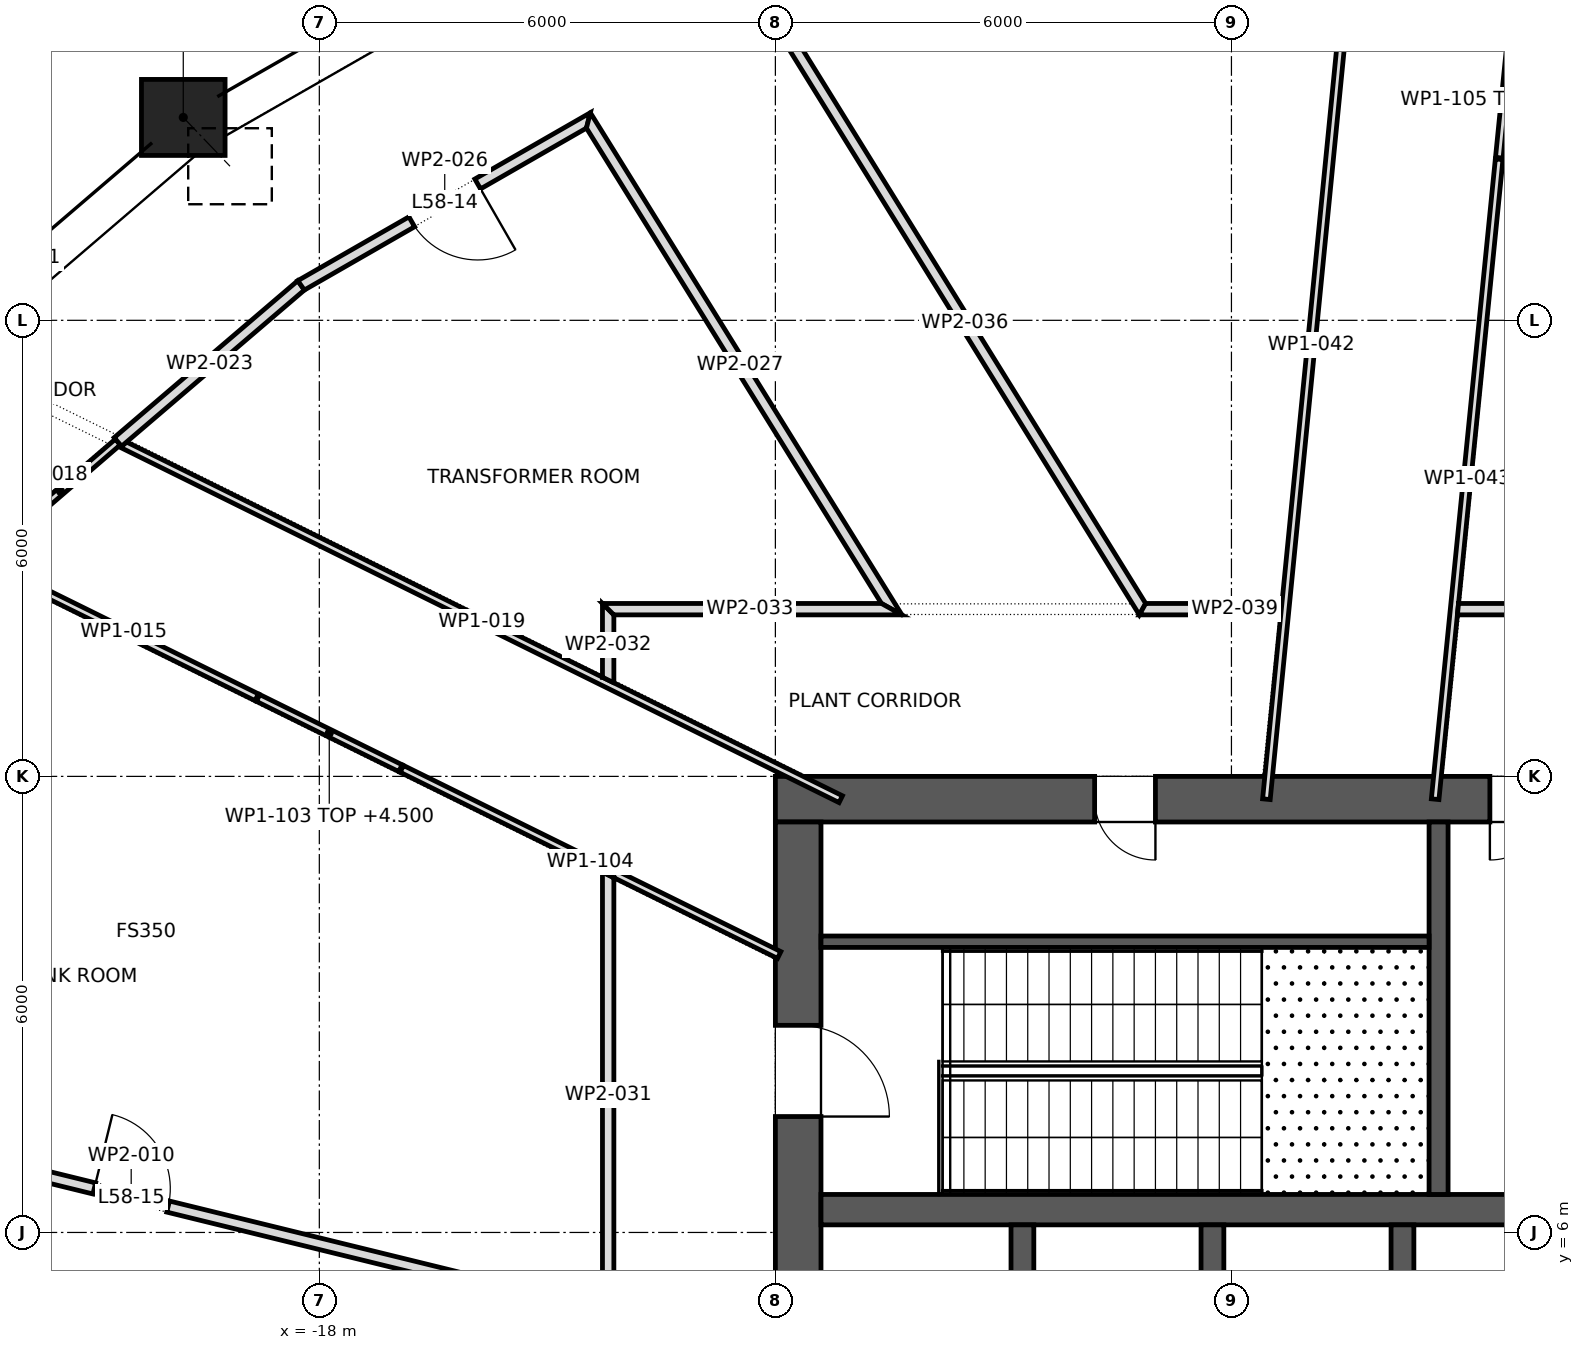
"""IFC4 building model, lengths in metres.
Left out: names, types, materials, properties, quantities, classifications, styles, units other than length and angle.
Written with IfcOpenShell. Run it as: python <this file> out.ifc"""

import sys

from ifc_helpers import new_model, si_unit, direction, frame, frame_2d, origin, origin_2d, place, context, subcontext, project, spatial, polyline, rectangle, outline, extrude, element, fill, save


model = new_model("IFC4")
c1 = context("Model", 3, precision=1e-05, world=origin(), true_north=direction((0.0, 1.0)))
c2 = subcontext(c1, "Body", "Model", "MODEL_VIEW")
j1 = project(units=[si_unit("LENGTHUNIT", "METRE"), si_unit("PLANEANGLEUNIT", "RADIAN")], contexts=[c1])
p1 = place(None, origin())
s1 = spatial("IfcSite", under=j1, at=p1, CompositionType="ELEMENT")
p2 = place(p1, origin())
s2 = spatial("IfcBuilding", under=s1, at=p2, CompositionType="ELEMENT")
p3 = place(p2, frame((0.0, 0.0, 250.9)))
s3 = spatial("IfcBuildingStorey", under=s2, at=p3, CompositionType="ELEMENT", Elevation=250.9)
p4 = place(p3, frame((-19.79, 20.669, 0.083), z_axis=(0.115812481815, -0.12096379157, 0.985877898213), x_axis=(0.722319686129, 0.691559304059, 0.0)))
e1 = element("IfcColumn", 1, at=p4, inside=s3, PredefinedType="COLUMN", context=c2, shape_type="SweptSolid", body=[
    extrude(rectangle(XDim=1.1, YDim=1.0, at=origin_2d()), origin(), (0.0, 0.0, 1.0), 5.308),
])
p5 = place(p3, frame((-12.0, 11.7, 0.0), z_axis=(0.0, 0.0, 1.0), x_axis=(1.0, 0.0, 0.0)))
e2 = element("IfcWall", 2, at=p5, inside=s3, PredefinedType="SHEAR", context=c2, shape_type="SweptSolid", body=[
    extrude(rectangle(XDim=24.0, YDim=0.6, at=frame_2d((12.0, 0.0))), origin(), (0.0, 0.0, 1.0), 5.4),
])
p6 = place(p5, frame((9.4, 0.0, 0.0)))
e3 = element("IfcOpeningElement", 3, at=p6, cuts=e2, PredefinedType="OPENING", context=c2, shape_type="SweptSolid", body=[
    extrude(rectangle(XDim=0.8, YDim=2.1, at=frame_2d((0.4, 1.05))), frame((0.0, 0.312, 0.0), z_axis=(0.0, -1.0, 0.0), x_axis=(1.0, 0.0, 0.0)), (0.0, 0.0, 1.0), 0.624),
])
p7 = place(p5, frame((11.05, 0.0, 0.0)))
e4 = element("IfcOpeningElement", 4, at=p7, cuts=e2, PredefinedType="OPENING", context=c2, shape_type="SweptSolid", body=[
    extrude(rectangle(XDim=0.8, YDim=2.1, at=frame_2d((0.4, 1.05))), frame((0.0, 0.312, 0.0), z_axis=(0.0, -1.0, 0.0), x_axis=(1.0, 0.0, 0.0)), (0.0, 0.0, 1.0), 0.624),
])
p8 = place(p5, frame((4.2, 0.0, 0.0)))
e5 = element("IfcOpeningElement", 5, at=p8, cuts=e2, PredefinedType="OPENING", context=c2, shape_type="SweptSolid", body=[
    extrude(rectangle(XDim=0.8, YDim=2.1, at=frame_2d((0.4, 1.05))), frame((0.0, 0.312, 0.0), z_axis=(0.0, -1.0, 0.0), x_axis=(1.0, 0.0, 0.0)), (0.0, 0.0, 1.0), 0.624),
])
p9 = place(p5, frame((15.85, 0.0, 0.0)))
e6 = element("IfcOpeningElement", 6, at=p9, cuts=e2, PredefinedType="OPENING", context=c2, shape_type="SweptSolid", body=[
    extrude(rectangle(XDim=0.8, YDim=2.1, at=frame_2d((0.4, 1.05))), frame((0.0, 0.312, 0.0), z_axis=(0.0, -1.0, 0.0), x_axis=(1.0, 0.0, 0.0)), (0.0, 0.0, 1.0), 0.624),
])
p10 = place(p3, frame((-11.7, -11.4, 0.0), z_axis=(0.0, 0.0, 1.0), x_axis=(0.0, 1.0, 0.0)))
e7 = element("IfcWall", 7, at=p10, inside=s3, PredefinedType="SHEAR", context=c2, shape_type="SweptSolid", body=[
    extrude(rectangle(XDim=22.8, YDim=0.6, at=frame_2d((11.4, 0.0))), origin(), (0.0, 0.0, 1.0), 5.4),
])
p11 = place(p10, frame((10.2, 0.0, 0.0)))
e8 = element("IfcOpeningElement", 8, at=p11, cuts=e7, PredefinedType="OPENING", context=c2, shape_type="SweptSolid", body=[
    extrude(rectangle(XDim=2.4, YDim=2.1, at=frame_2d((1.2, 1.05))), frame((0.0, 0.312, 0.0), z_axis=(0.0, -1.0, 0.0), x_axis=(1.0, 0.0, 0.0)), (0.0, 0.0, 1.0), 0.624),
])
p12 = place(p10, frame((18.925, 0.0, 0.0)))
e9 = element("IfcOpeningElement", 9, at=p12, cuts=e7, PredefinedType="OPENING", context=c2, shape_type="SweptSolid", body=[
    extrude(rectangle(XDim=1.2, YDim=2.1, at=frame_2d((0.6, 1.05))), frame((0.0, 0.312, 0.0), z_axis=(0.0, -1.0, 0.0), x_axis=(1.0, 0.0, 0.0)), (0.0, 0.0, 1.0), 0.624),
])
p13 = place(p10, frame((2.675, 0.0, 0.0)))
e10 = element("IfcOpeningElement", 10, at=p13, cuts=e7, PredefinedType="OPENING", context=c2, shape_type="SweptSolid", body=[
    extrude(rectangle(XDim=1.2, YDim=2.1, at=frame_2d((0.6, 1.05))), frame((0.0, 0.312, 0.0), z_axis=(0.0, -1.0, 0.0), x_axis=(1.0, 0.0, 0.0)), (0.0, 0.0, 1.0), 0.624),
])
p14 = place(p3, frame((-11.4, 6.3, 0.0), z_axis=(0.0, 0.0, 1.0), x_axis=(1.0, 0.0, 0.0)))
e11 = element("IfcWall", 11, at=p14, inside=s3, PredefinedType="SHEAR", context=c2, shape_type="SweptSolid", body=[
    extrude(rectangle(XDim=22.8, YDim=0.4, at=frame_2d((11.4, 0.0))), origin(), (0.0, 0.0, 1.0), 5.4),
])
p15 = place(p14, frame((20.85, 0.0, 0.0)))
e12 = element("IfcOpeningElement", 12, at=p15, cuts=e11, PredefinedType="OPENING", context=c2, shape_type="SweptSolid", body=[
    extrude(rectangle(XDim=1.1, YDim=2.1, at=frame_2d((0.55, 1.05))), frame((0.0, 0.212, 0.0), z_axis=(0.0, -1.0, 0.0), x_axis=(1.0, 0.0, 0.0)), (0.0, 0.0, 1.0), 0.424),
])
for number, where, z_axis, x_axis in (
    (13, (-8.75, 3.2, 0.0), (0.0, 0.0, 1.0), (0.0, 1.0, 0.0)),
    (14, (-6.25, 3.2, 0.0), (0.0, 0.0, 1.0), (0.0, 1.0, 0.0)),
    (15, (-3.75, 3.2, 0.0), (0.0, 0.0, 1.0), (0.0, 1.0, 0.0)),
):
    element("IfcWall", number, at=place(p3, frame(where, z_axis=z_axis, x_axis=x_axis)), inside=s3, PredefinedType="SHEAR", context=c2, shape_type="SweptSolid", body=[
        extrude(rectangle(XDim=2.9, YDim=0.3, at=frame_2d((1.45, 0.0))), origin(), (0.0, 0.0, 1.0), 5.4),
    ])
p16 = place(p3, frame((-3.275, 6.5, 0.0), z_axis=(0.0, 0.0, 1.0), x_axis=(0.0, 1.0, 0.0)))
e16 = element("IfcWall", 16, at=p16, inside=s3, PredefinedType="SHEAR", context=c2, shape_type="SweptSolid", body=[
    extrude(rectangle(XDim=4.9, YDim=0.25, at=frame_2d((2.45, 0.0))), origin(), (0.0, 0.0, 1.0), 5.1),
])
p17 = place(p3, frame((-11.4, 9.825, 0.0), z_axis=(0.0, 0.0, 1.0), x_axis=(1.0, 0.0, 0.0)))
e17 = element("IfcWall", 17, at=p17, inside=s3, PredefinedType="SHEAR", context=c2, shape_type="SweptSolid", body=[
    extrude(rectangle(XDim=8.0, YDim=0.15, at=frame_2d((4.0, 0.0))), origin(), (0.0, 0.0, 1.0), 5.1),
])
p18 = place(p3, frame((-26.84, 8.022, 0.0), z_axis=(0.0, 0.0, 1.0), x_axis=(0.971181734847, -0.238340172652, 0.0)))
e18 = element("IfcWall", 18, at=p18, inside=s3, PredefinedType="PARTITIONING", context=c2, shape_type="SweptSolid", body=[
    extrude(outline(polyline([(0.0, -0.075), (1.873, -0.075), (3.746, -0.075), (5.619, -0.075), (7.492, -0.075), (9.365, -0.075), (11.238, -0.075), (13.111, -0.075), (12.919, 0.075), (11.1, 0.075), (9.281, 0.075), (7.462, 0.075), (5.643, 0.075), (3.823, 0.075), (2.004, 0.075), (0.185, 0.075), (0.0, -0.075), (0.0, -0.075)])), origin(), (0.0, 0.0, 1.0), 5.1),
])
p19 = place(p18, frame((6.054, 0.0, 0.0)))
e19 = element("IfcOpeningElement", 19, at=p19, cuts=e18, PredefinedType="OPENING", context=c2, shape_type="SweptSolid", body=[
    extrude(rectangle(XDim=1.0, YDim=2.1, at=frame_2d((0.5, 1.05))), frame((0.0, 0.087, 0.0), z_axis=(0.0, -1.0, 0.0), x_axis=(1.0, 0.0, 0.0)), (0.0, 0.0, 1.0), 0.174),
])
p20 = place(p3, frame((-22.335, 14.773, 0.0), z_axis=(0.0, 0.0, 1.0), x_axis=(0.896802594661, -0.442430905577, 0.0)))
e20 = element("IfcWall", 20, at=p20, inside=s3, PredefinedType="PARTITIONING", context=c2, shape_type="SweptSolid", body=[
    extrude(outline(polyline([(0.0, 0.05), (0.0, -0.015), (0.012, -0.017), (0.005, -0.05), (1.965, -0.05), (3.926, -0.05), (3.926, 0.05), (1.963, 0.05), (0.0, 0.05)])), origin(), (0.0, 0.0, 1.0), 5.1),
])
p21 = place(p3, frame((-20.65, 16.4, 0.0), z_axis=(0.0, 0.0, 1.0), x_axis=(-0.757874548708, -0.652400313014, 0.0)))
e21 = element("IfcWall", 21, at=p21, inside=s3, PredefinedType="PARTITIONING", context=c2, shape_type="SweptSolid", body=[
    extrude(outline(polyline([(1.998, -0.05), (1.998, -0.049), (1.987, 0.05), (0.0, 0.05), (0.0, -0.05), (1.998, -0.05)])), origin(), (0.0, 0.0, 1.0), 5.1),
])
p22 = place(p3, frame((-20.62, 16.385, 0.0), z_axis=(0.0, 0.0, 1.0), x_axis=(0.896490791299, -0.443062367073, 0.0)))
e22 = element("IfcWall", 22, at=p22, inside=s3, PredefinedType="PARTITIONING", context=c2, shape_type="SweptSolid", body=[
    extrude(outline(polyline([(10.575, 0.05), (8.817, 0.05), (7.059, 0.05), (7.054, 0.048), (7.053, 0.05), (5.307, 0.05), (3.561, 0.05), (1.815, 0.05), (0.07, 0.05), (0.036, -0.03), (0.013, -0.02), (0.0, -0.05), (0.0, -0.05), (1.762, -0.05), (3.525, -0.05), (5.287, -0.05), (7.05, -0.05), (8.812, -0.05), (10.575, -0.05), (10.575, 0.05)])), origin(), (0.0, 0.0, 1.0), 5.1),
])
p23 = place(p3, frame((-18.235, 18.465, 0.0), z_axis=(0.0, 0.0, 1.0), x_axis=(-0.76011828392, -0.649784729315, 0.0)))
e23 = element("IfcWall", 23, at=p23, inside=s3, PredefinedType="PARTITIONING", context=c2, shape_type="SweptSolid", body=[
    extrude(outline(polyline([(3.177, 0.075), (1.596, 0.075), (0.014, 0.075), (0.0, -0.075), (1.589, -0.075), (3.177, -0.075), (3.177, 0.075)])), origin(), (0.0, 0.0, 1.0), 5.1),
])
p24 = place(p3, frame((-14.397, 20.666, 0.0), z_axis=(0.0, 0.0, 1.0), x_axis=(-0.867259694759, -0.497856025219, 0.0)))
e24 = element("IfcWall", 24, at=p24, inside=s3, PredefinedType="PARTITIONING", context=c2, shape_type="SweptSolid", body=[
    extrude(outline(polyline([(0.0, -0.075), (1.479, -0.075), (2.959, -0.075), (4.438, -0.075), (4.424, 0.075), (2.998, 0.075), (1.571, 0.075), (0.145, 0.075), (0.0, -0.075), (0.0, -0.075)])), origin(), (0.0, 0.0, 1.0), 5.1),
])
p25 = place(p24, frame((1.752, 0.0, 0.0)))
e25 = element("IfcOpeningElement", 25, at=p25, cuts=e24, PredefinedType="OPENING", context=c2, shape_type="SweptSolid", body=[
    extrude(rectangle(XDim=1.0, YDim=2.1, at=frame_2d((0.5, 1.05))), frame((0.0, 0.087, 0.0), z_axis=(0.0, -1.0, 0.0), x_axis=(1.0, 0.0, 0.0)), (0.0, 0.0, 1.0), 0.174),
])
p26 = place(p3, frame((-14.498, 20.692, 0.0), z_axis=(0.0, 0.0, 1.0), x_axis=(0.527266712456, -0.849699837552, 0.0)))
e26 = element("IfcWall", 26, at=p26, inside=s3, PredefinedType="PARTITIONING", context=c2, shape_type="SweptSolid", body=[
    extrude(outline(polyline([(0.145, -0.075), (1.985, -0.075), (3.825, -0.075), (5.665, -0.075), (7.505, -0.075), (7.775, 0.075), (5.831, 0.075), (3.887, 0.075), (1.944, 0.075), (0.0, 0.075), (0.145, -0.075)])), origin(), (0.0, 0.0, 1.0), 5.1),
])
p27 = place(p3, frame((-14.2, 4.824, 0.0), z_axis=(0.0, 0.0, 1.0), x_axis=(0.0, 1.0, 0.0)))
e27 = element("IfcWall", 27, at=p27, inside=s3, PredefinedType="PARTITIONING", context=c2, shape_type="SweptSolid", body=[
    extrude(outline(polyline([(0.0, -0.075), (1.948, -0.075), (3.895, -0.075), (5.843, -0.075), (5.917, 0.075), (5.917, 0.075), (4.008, 0.075), (2.1, 0.075), (0.191, 0.075), (0.095, 0.0), (0.0, -0.075), (0.0, -0.075)])), origin(), (0.0, 0.0, 1.0), 5.1),
])
p28 = place(p3, frame((-14.2, 13.231, 0.0), z_axis=(0.0, 0.0, 1.0), x_axis=(0.0, 1.0, 0.0)))
e28 = element("IfcWall", 28, at=p28, inside=s3, PredefinedType="PARTITIONING", context=c2, shape_type="SweptSolid", body=[
    extrude(outline(polyline([(0.0, -0.075), (0.894, -0.075), (1.043, 0.075), (0.074, 0.075), (0.0, -0.074), (0.0, -0.075)])), origin(), (0.0, 0.0, 1.0), 5.1),
])
p29 = place(p3, frame((-14.275, 14.2, 0.0), z_axis=(0.0, 0.0, 1.0), x_axis=(1.0, 0.0, 0.0)))
e29 = element("IfcWall", 29, at=p29, inside=s3, PredefinedType="PARTITIONING", context=c2, shape_type="SweptSolid", body=[
    extrude(outline(polyline([(3.94, -0.075), (3.94, -0.075), (3.67, 0.075), (1.835, 0.075), (0.0, 0.075), (0.15, -0.075), (2.045, -0.075), (3.94, -0.075)])), origin(), (0.0, 0.0, 1.0), 5.1),
])
p30 = place(p3, frame((-11.889, 21.819, 0.0), z_axis=(0.0, 0.0, 1.0), x_axis=(0.526562768586, -0.85013625422, 0.0)))
e30 = element("IfcWall", 30, at=p30, inside=s3, PredefinedType="PARTITIONING", context=c2, shape_type="SweptSolid", body=[
    extrude(outline(polyline([(0.0, -0.075), (1.801, -0.075), (3.602, -0.075), (5.402, -0.075), (7.203, -0.075), (9.004, -0.075), (8.92, 0.075), (7.173, 0.075), (5.426, 0.075), (3.679, 0.075), (1.932, 0.075), (0.185, 0.075), (0.0, -0.075)])), origin(), (0.0, 0.0, 1.0), 5.1),
])
p31 = place(p3, frame((-7.212, 14.2, 0.0), z_axis=(0.0, 0.0, 1.0), x_axis=(1.0, 0.0, 0.0)))
e31 = element("IfcWall", 31, at=p31, inside=s3, PredefinedType="PARTITIONING", context=c2, shape_type="SweptSolid", body=[
    extrude(outline(polyline([(0.0, -0.075), (1.861, -0.075), (1.875, 0.073), (1.875, 0.075), (0.084, 0.075), (0.042, 0.0), (0.0, -0.075)])), origin(), (0.0, 0.0, 1.0), 5.1),
])
p32 = place(p3, frame((-5.54, 11.7, 0.0), z_axis=(0.0, 0.0, 1.0), x_axis=(0.098192347243, 0.995167454725, 0.0)))
e32 = element("IfcWall", 32, at=p32, inside=s3, PredefinedType="PARTITIONING", context=c2, shape_type="SweptSolid", body=[
    extrude(rectangle(XDim=12.019, YDim=0.1, at=frame_2d((6.01, 0.0))), origin(), (0.0, 0.0, 1.0), 5.1),
])
p33 = place(p3, frame((-3.32, 11.7, 0.0), z_axis=(0.0, 0.0, 1.0), x_axis=(0.0995179867, 0.995035763339, 0.0)))
e33 = element("IfcWall", 33, at=p33, inside=s3, PredefinedType="PARTITIONING", context=c2, shape_type="SweptSolid", body=[
    extrude(outline(polyline([(0.0, -0.05), (1.295, -0.05), (2.59, -0.05), (2.593, -0.05), (2.593, -0.05), (4.552, -0.05), (6.512, -0.05), (8.471, -0.05), (8.471, 0.05), (6.777, 0.05), (5.083, 0.05), (3.388, 0.05), (1.694, 0.05), (0.0, 0.05), (0.0, -0.05)])), origin(), (0.0, 0.0, 1.0), 5.1),
])
p34 = place(p3, frame((-3.027, 14.2, 0.0), z_axis=(0.0, 0.0, 1.0), x_axis=(1.0, 0.0, 0.0)))
e34 = element("IfcWall", 34, at=p34, inside=s3, PredefinedType="PARTITIONING", context=c2, shape_type="SweptSolid", body=[
    extrude(outline(polyline([(5.723, -0.075), (5.723, -0.075), (5.667, 0.0), (5.611, 0.075), (3.745, 0.075), (1.88, 0.075), (0.015, 0.075), (0.0, -0.073), (0.0, -0.075), (1.908, -0.075), (3.816, -0.075), (5.723, -0.075)])), origin(), (0.0, 0.0, 1.0), 5.1),
])
p35 = place(p34, frame((2.317, 0.0, 0.0)))
e35 = element("IfcOpeningElement", 35, at=p35, cuts=e34, PredefinedType="OPENING", context=c2, shape_type="SweptSolid", body=[
    extrude(rectangle(XDim=1.0, YDim=2.1, at=frame_2d((0.5, 1.05))), frame((0.0, 0.087, 0.0), z_axis=(0.0, -1.0, 0.0), x_axis=(1.0, 0.0, 0.0)), (0.0, 0.0, 1.0), 0.174),
])
p36 = place(p3, frame((-18.815, 13.036, 0.0), z_axis=(0.0, 0.0, 1.0), x_axis=(0.896845699722, -0.442343521361, 0.0)))
e36 = element("IfcWall", 36, at=p36, inside=s3, PredefinedType="PARTITIONING", context=c2, shape_type="SweptSolid", body=[
    extrude(outline(polyline([(0.0, 0.05), (0.0, -0.05), (2.108, -0.05), (2.108, 0.05), (0.0, 0.05)])), origin(), (0.0, 0.0, 1.0), 4.5),
])
p37 = place(p3, frame((-16.924, 12.104, 0.0), z_axis=(0.0, 0.0, 1.0), x_axis=(0.896817761144, -0.442400161954, 0.0)))
e37 = element("IfcWall", 37, at=p37, inside=s3, PredefinedType="PARTITIONING", context=c2, shape_type="SweptSolid", body=[
    extrude(outline(polyline([(0.0, -0.05), (1.569, -0.05), (3.139, -0.05), (3.144, -0.047), (3.146, -0.05), (5.546, -0.05), (5.546, 0.05), (3.698, 0.05), (1.849, 0.05), (0.0, 0.05), (0.0, -0.05)])), origin(), (0.0, 0.0, 1.0), 5.1),
])
p38 = place(p3, frame((-2.477, 20.129, 0.0), z_axis=(0.0, 0.0, 1.0), x_axis=(0.099535204501, 0.995034041159, 0.0)))
e38 = element("IfcWall", 38, at=p38, inside=s3, PredefinedType="PARTITIONING", context=c2, shape_type="SweptSolid", body=[
    extrude(outline(polyline([(0.0, 0.05), (0.0, -0.05), (1.535, -0.05), (1.535, 0.05), (0.0, 0.05)])), origin(), (0.0, 0.0, 1.0), 4.5),
])
p39 = place(p12, frame((1.2, 0.0, 0.0), z_axis=(0.0, 0.0, 1.0), x_axis=(-1.0, 0.0, 0.0)))
e39 = element("IfcDoor", 39, at=p39, inside=s3, OperationType="SINGLE_SWING_LEFT", PredefinedType="DOOR", context=c2, shape_type="SweptSolid", body=[
    extrude(rectangle(XDim=1.2, YDim=2.1, at=frame_2d((0.6, 1.05))), frame((0.0, 0.025, 0.0), z_axis=(0.0, -1.0, 0.0), x_axis=(1.0, 0.0, 0.0)), (0.0, 0.0, 1.0), 0.05),
])
fill(e9, e39)
p40 = place(p6, frame((0.8, 0.0, 0.0), z_axis=(0.0, 0.0, 1.0), x_axis=(-1.0, 0.0, 0.0)))
e40 = element("IfcDoor", 40, at=p40, inside=s3, OperationType="SINGLE_SWING_LEFT", PredefinedType="DOOR", context=c2, shape_type="SweptSolid", body=[
    extrude(rectangle(XDim=0.8, YDim=2.1, at=frame_2d((0.4, 1.05))), frame((0.0, 0.025, 0.0), z_axis=(0.0, -1.0, 0.0), x_axis=(1.0, 0.0, 0.0)), (0.0, 0.0, 1.0), 0.05),
])
fill(e3, e40)
p41 = place(p8, frame((0.8, 0.0, 0.0), z_axis=(0.0, 0.0, 1.0), x_axis=(-1.0, 0.0, 0.0)))
e41 = element("IfcDoor", 41, at=p41, inside=s3, OperationType="SINGLE_SWING_RIGHT", PredefinedType="DOOR", context=c2, shape_type="SweptSolid", body=[
    extrude(rectangle(XDim=0.8, YDim=2.1, at=frame_2d((0.4, 1.05))), frame((0.0, 0.025, 0.0), z_axis=(0.0, -1.0, 0.0), x_axis=(1.0, 0.0, 0.0)), (0.0, 0.0, 1.0), 0.05),
])
fill(e5, e41)
p42 = place(p25, origin())
e42 = element("IfcDoor", 42, at=p42, inside=s3, OperationType="SINGLE_SWING_RIGHT", PredefinedType="DOOR", context=c2, shape_type="SweptSolid", body=[
    extrude(rectangle(XDim=1.0, YDim=2.1, at=frame_2d((0.5, 1.05))), frame((0.0, 0.025, 0.0), z_axis=(0.0, -1.0, 0.0), x_axis=(1.0, 0.0, 0.0)), (0.0, 0.0, 1.0), 0.05),
])
fill(e25, e42)
p43 = place(p19, origin())
e43 = element("IfcDoor", 43, at=p43, inside=s3, OperationType="SINGLE_SWING_RIGHT", PredefinedType="DOOR", context=c2, shape_type="SweptSolid", body=[
    extrude(rectangle(XDim=1.0, YDim=2.1, at=frame_2d((0.5, 1.05))), frame((0.0, 0.025, 0.0), z_axis=(0.0, -1.0, 0.0), x_axis=(1.0, 0.0, 0.0)), (0.0, 0.0, 1.0), 0.05),
])
fill(e19, e43)
save(model, sys.argv[1])
